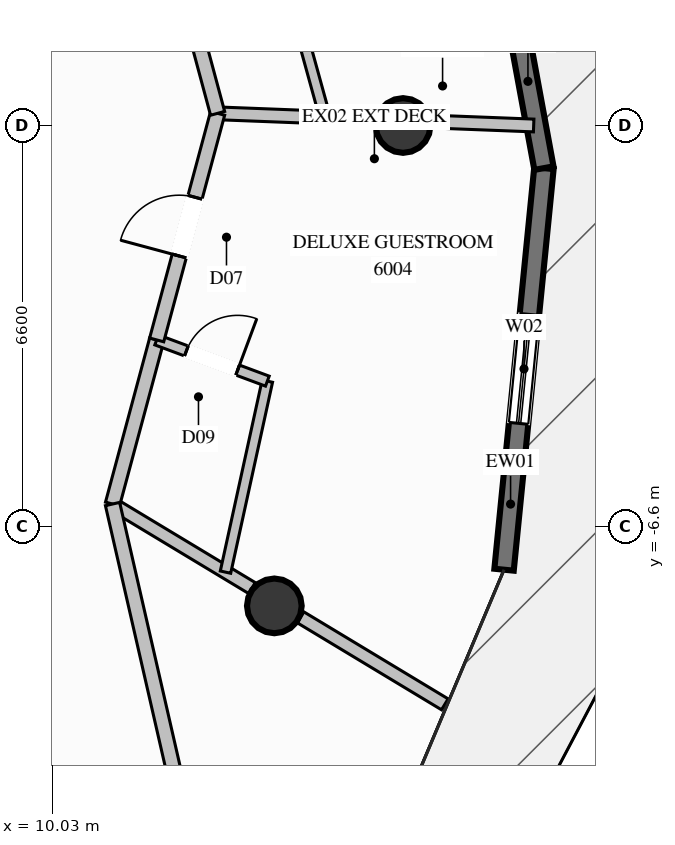
"""IFC4 building model, lengths in metres.
Left out: names, types, materials, properties, quantities, classifications, styles, units other than length and angle.
Written with IfcOpenShell. Run it as: python <this file> out.ifc"""

import sys

from ifc_helpers import new_model, si_unit, direction, frame, frame_2d, origin, origin_2d, place, context, subcontext, project, spatial, rectangle, circle, extrude, element, fill, save


model = new_model("IFC4")
c1 = context("Model", 3, precision=1e-05, world=origin(), true_north=direction((0.0, 1.0)))
c2 = subcontext(c1, "Body", "Model", "MODEL_VIEW")
j1 = project(units=[si_unit("LENGTHUNIT", "METRE"), si_unit("PLANEANGLEUNIT", "RADIAN")], contexts=[c1])
p1 = place(None, origin())
s1 = spatial("IfcSite", under=j1, at=p1, CompositionType="ELEMENT")
p2 = place(p1, origin())
s2 = spatial("IfcBuilding", under=s1, at=p2, CompositionType="ELEMENT")
p3 = place(p2, frame((0.0, 0.0, 223.6)))
s3 = spatial("IfcBuildingStorey", under=s2, at=p3, CompositionType="ELEMENT", Elevation=223.6)
for number, where, z_axis, x_axis in (
    (1, (15.8, 0.0, 0.0), (0.0, 0.0, 1.0), (1.0, 0.0, 0.0)),
    (2, (13.683, -7.9, 0.0), (0.0, 0.0, 1.0), (1.0, 0.0, 0.0)),
):
    element("IfcColumn", number, at=place(p3, frame(where, z_axis=z_axis, x_axis=x_axis)), inside=s3, PredefinedType="COLUMN", context=c2, shape_type="SweptSolid", body=[
        extrude(circle(Radius=0.45, at=origin_2d()), origin(), (0.0, 0.0, 1.0), 3.6),
    ])
p4 = place(p3, frame((18.117, -0.701, 0.0), z_axis=(0.0, 0.0, 1.0), x_axis=(-0.098848078175, -0.995102536144, 0.0)))
e3 = element("IfcWall", 3, at=p4, inside=s3, PredefinedType="SOLIDWALL", context=c2, shape_type="SweptSolid", body=[
    extrude(rectangle(XDim=6.636, YDim=0.32, at=frame_2d((3.318, 0.0))), origin(), (0.0, 0.0, 1.0), 3.36),
])
p5 = place(p4, frame((2.418, 0.0, 0.35)))
e4 = element("IfcOpeningElement", 4, at=p5, cuts=e3, PredefinedType="OPENING", context=c2, shape_type="SweptSolid", body=[
    extrude(rectangle(XDim=1.8, YDim=2.6, at=frame_2d((0.9, 1.3))), frame((0.0, 0.17, 0.0), z_axis=(0.0, -1.0, 0.0), x_axis=(1.0, 0.0, 0.0)), (0.0, 0.0, 1.0), 0.34),
])
p6 = place(p3, frame((16.887, 5.972, 0.0), z_axis=(0.0, 0.0, 1.0), x_axis=(0.181272323457, -0.983432938613, 0.0)))
e5 = element("IfcWall", 5, at=p6, inside=s3, PredefinedType="SOLIDWALL", context=c2, shape_type="SweptSolid", body=[
    extrude(rectangle(XDim=6.785, YDim=0.32, at=frame_2d((3.393, 0.0))), origin(), (0.0, 0.0, 1.0), 3.36),
])
p7 = place(p6, frame((2.533, 0.0, 0.0)))
e6 = element("IfcOpeningElement", 6, at=p7, cuts=e5, PredefinedType="OPENING", context=c2, shape_type="SweptSolid", body=[
    extrude(rectangle(XDim=1.1, YDim=2.2, at=frame_2d((0.55, 1.1))), frame((0.0, 0.17, 0.0), z_axis=(0.0, -1.0, 0.0), x_axis=(1.0, 0.0, 0.0)), (0.0, 0.0, 1.0), 0.34),
])
p8 = place(p3, frame((12.75, 0.2, 0.0), z_axis=(0.0, 0.0, 1.0), x_axis=(0.999258251159, -0.038509057262, 0.0)))
e7 = element("IfcWall", 7, at=p8, inside=s3, PredefinedType="PARTITIONING", context=c2, shape_type="SweptSolid", body=[
    extrude(rectangle(XDim=2.593, YDim=0.21, at=frame_2d((1.296, 0.0))), origin(), (0.0, 0.0, 1.0), 3.36),
])
p9 = place(p3, frame((16.266, 0.065, 0.0), z_axis=(0.0, 0.0, 1.0), x_axis=(0.999255378418, -0.03858352891, 0.0)))
e8 = element("IfcWall", 8, at=p9, inside=s3, PredefinedType="PARTITIONING", context=c2, shape_type="SweptSolid", body=[
    extrude(rectangle(XDim=1.683, YDim=0.21, at=frame_2d((0.842, 0.0))), origin(), (0.0, 0.0, 1.0), 3.36),
])
p10 = place(p3, frame((11.022, -6.225, 0.0), z_axis=(0.0, 0.0, 1.0), x_axis=(0.856493544161, -0.516157736366, 0.0)))
e9 = element("IfcWall", 9, at=p10, inside=s3, PredefinedType="PARTITIONING", context=c2, shape_type="SweptSolid", body=[
    extrude(rectangle(XDim=2.677, YDim=0.21, at=frame_2d((1.339, 0.0))), origin(), (0.0, 0.0, 1.0), 2.801),
])
p11 = place(p3, frame((14.114, -8.088, 0.0), z_axis=(0.0, 0.0, 1.0), x_axis=(0.856324704074, -0.516437799926, 0.0)))
e10 = element("IfcWall", 10, at=p11, inside=s3, PredefinedType="PARTITIONING", context=c2, shape_type="SweptSolid", body=[
    extrude(rectangle(XDim=2.771, YDim=0.21, at=frame_2d((1.386, 0.0))), origin(), (0.0, 0.0, 1.0), 3.36),
])
p12 = place(p3, frame((11.022, -6.225, 0.0), z_axis=(0.0, 0.0, 1.0), x_axis=(0.259760468719, 0.965673080753, 0.0)))
e11 = element("IfcWall", 11, at=p12, inside=s3, PredefinedType="PARTITIONING", context=c2, shape_type="SweptSolid", body=[
    extrude(rectangle(XDim=2.795, YDim=0.24, at=frame_2d((1.397, 0.0))), origin(), (0.0, 0.0, 1.0), 3.36),
])
p13 = place(p3, frame((12.88, -7.345, 0.0), z_axis=(0.0, 0.0, 1.0), x_axis=(0.214043321531, 0.976824168675, 0.0)))
e12 = element("IfcWall", 12, at=p13, inside=s3, PredefinedType="PLUMBINGWALL", context=c2, shape_type="SweptSolid", body=[
    extrude(rectangle(XDim=3.215, YDim=0.175, at=frame_2d((1.608, 0.0))), origin(), (0.0, 0.0, 1.0), 3.36),
])
p14 = place(p3, frame((11.748, -3.526, 0.0), z_axis=(0.0, 0.0, 1.0), x_axis=(0.937055504851, -0.349180441647, 0.0)))
e13 = element("IfcWall", 13, at=p14, inside=s3, PredefinedType="PLUMBINGWALL", context=c2, shape_type="SweptSolid", body=[
    extrude(rectangle(XDim=1.942, YDim=0.175, at=frame_2d((0.971, 0.0))), origin(), (0.0, 0.0, 1.0), 3.36),
])
p15 = place(p14, frame((0.521, 0.0, 0.0)))
e14 = element("IfcOpeningElement", 14, at=p15, cuts=e13, PredefinedType="OPENING", context=c2, shape_type="SweptSolid", body=[
    extrude(rectangle(XDim=0.9, YDim=2.1, at=frame_2d((0.45, 1.05))), frame((0.0, 0.098, 0.0), z_axis=(0.0, -1.0, 0.0), x_axis=(1.0, 0.0, 0.0)), (0.0, 0.0, 1.0), 0.195),
])
p16 = place(p3, frame((11.748, -3.526, 0.0), z_axis=(0.0, 0.0, 1.0), x_axis=(0.259694339612, 0.965690866672, 0.0)))
e15 = element("IfcWall", 15, at=p16, inside=s3, PredefinedType="PARTITIONING", context=c2, shape_type="SweptSolid", body=[
    extrude(rectangle(XDim=3.858, YDim=0.24, at=frame_2d((1.929, 0.0))), origin(), (0.0, 0.0, 1.0), 3.36),
])
p17 = place(p16, frame((1.429, 0.0, 0.0)))
e16 = element("IfcOpeningElement", 16, at=p17, cuts=e15, PredefinedType="OPENING", context=c2, shape_type="SweptSolid", body=[
    extrude(rectangle(XDim=1.0, YDim=2.2, at=frame_2d((0.5, 1.1))), frame((0.0, 0.13, 0.0), z_axis=(0.0, -1.0, 0.0), x_axis=(1.0, 0.0, 0.0)), (0.0, 0.0, 1.0), 0.26),
])
p18 = place(p3, frame((12.75, 0.2, 0.0), z_axis=(0.0, 0.0, 1.0), x_axis=(-0.259870061474, 0.965643594267, 0.0)))
e17 = element("IfcWall", 17, at=p18, inside=s3, PredefinedType="PARTITIONING", context=c2, shape_type="SweptSolid", body=[
    extrude(rectangle(XDim=2.794, YDim=0.24, at=frame_2d((1.397, 0.0))), origin(), (0.0, 0.0, 1.0), 3.36),
])
p19 = place(p3, frame((14.517, 0.132, 0.0), z_axis=(0.0, 0.0, 1.0), x_axis=(-0.266040224846, 0.963961928068, 0.0)))
e18 = element("IfcWall", 18, at=p19, inside=s3, PredefinedType="PLUMBINGWALL", context=c2, shape_type="SweptSolid", body=[
    extrude(rectangle(XDim=3.165, YDim=0.175, at=frame_2d((1.583, 0.0))), origin(), (0.0, 0.0, 1.0), 3.36),
])
p20 = place(p3, frame((12.3, -11.8, 0.0), z_axis=(0.0, 0.0, 1.0), x_axis=(-0.223456421134, 0.974713921032, 0.0)))
e19 = element("IfcWall", 19, at=p20, inside=s3, PredefinedType="PARTITIONING", context=c2, shape_type="SweptSolid", body=[
    extrude(rectangle(XDim=5.719, YDim=0.24, at=frame_2d((2.86, 0.0))), origin(), (0.0, 0.0, 1.0), 3.36),
])
p21 = place(p5, origin())
e20 = element("IfcWindow", 20, at=p21, inside=s3, PartitioningType="SINGLE_PANEL", PredefinedType="WINDOW", context=c2, shape_type="SweptSolid", body=[
    extrude(rectangle(XDim=1.8, YDim=2.6, at=frame_2d((0.9, 1.3))), frame((0.0, 0.03, 0.0), z_axis=(0.0, -1.0, 0.0), x_axis=(1.0, 0.0, 0.0)), (0.0, 0.0, 1.0), 0.06),
])
fill(e4, e20)
p22 = place(p15, origin())
e21 = element("IfcDoor", 21, at=p22, inside=s3, OperationType="SINGLE_SWING_RIGHT", PredefinedType="DOOR", context=c2, shape_type="SweptSolid", body=[
    extrude(rectangle(XDim=0.9, YDim=2.1, at=frame_2d((0.45, 1.05))), frame((0.0, 0.025, 0.0), z_axis=(0.0, -1.0, 0.0), x_axis=(1.0, 0.0, 0.0)), (0.0, 0.0, 1.0), 0.05),
])
fill(e14, e21)
p23 = place(p17, origin())
e22 = element("IfcDoor", 22, at=p23, inside=s3, OperationType="SINGLE_SWING_LEFT", PredefinedType="DOOR", context=c2, shape_type="SweptSolid", body=[
    extrude(rectangle(XDim=1.0, YDim=2.2, at=frame_2d((0.5, 1.1))), frame((0.0, 0.025, 0.0), z_axis=(0.0, -1.0, 0.0), x_axis=(1.0, 0.0, 0.0)), (0.0, 0.0, 1.0), 0.05),
])
fill(e16, e22)
save(model, sys.argv[1])
